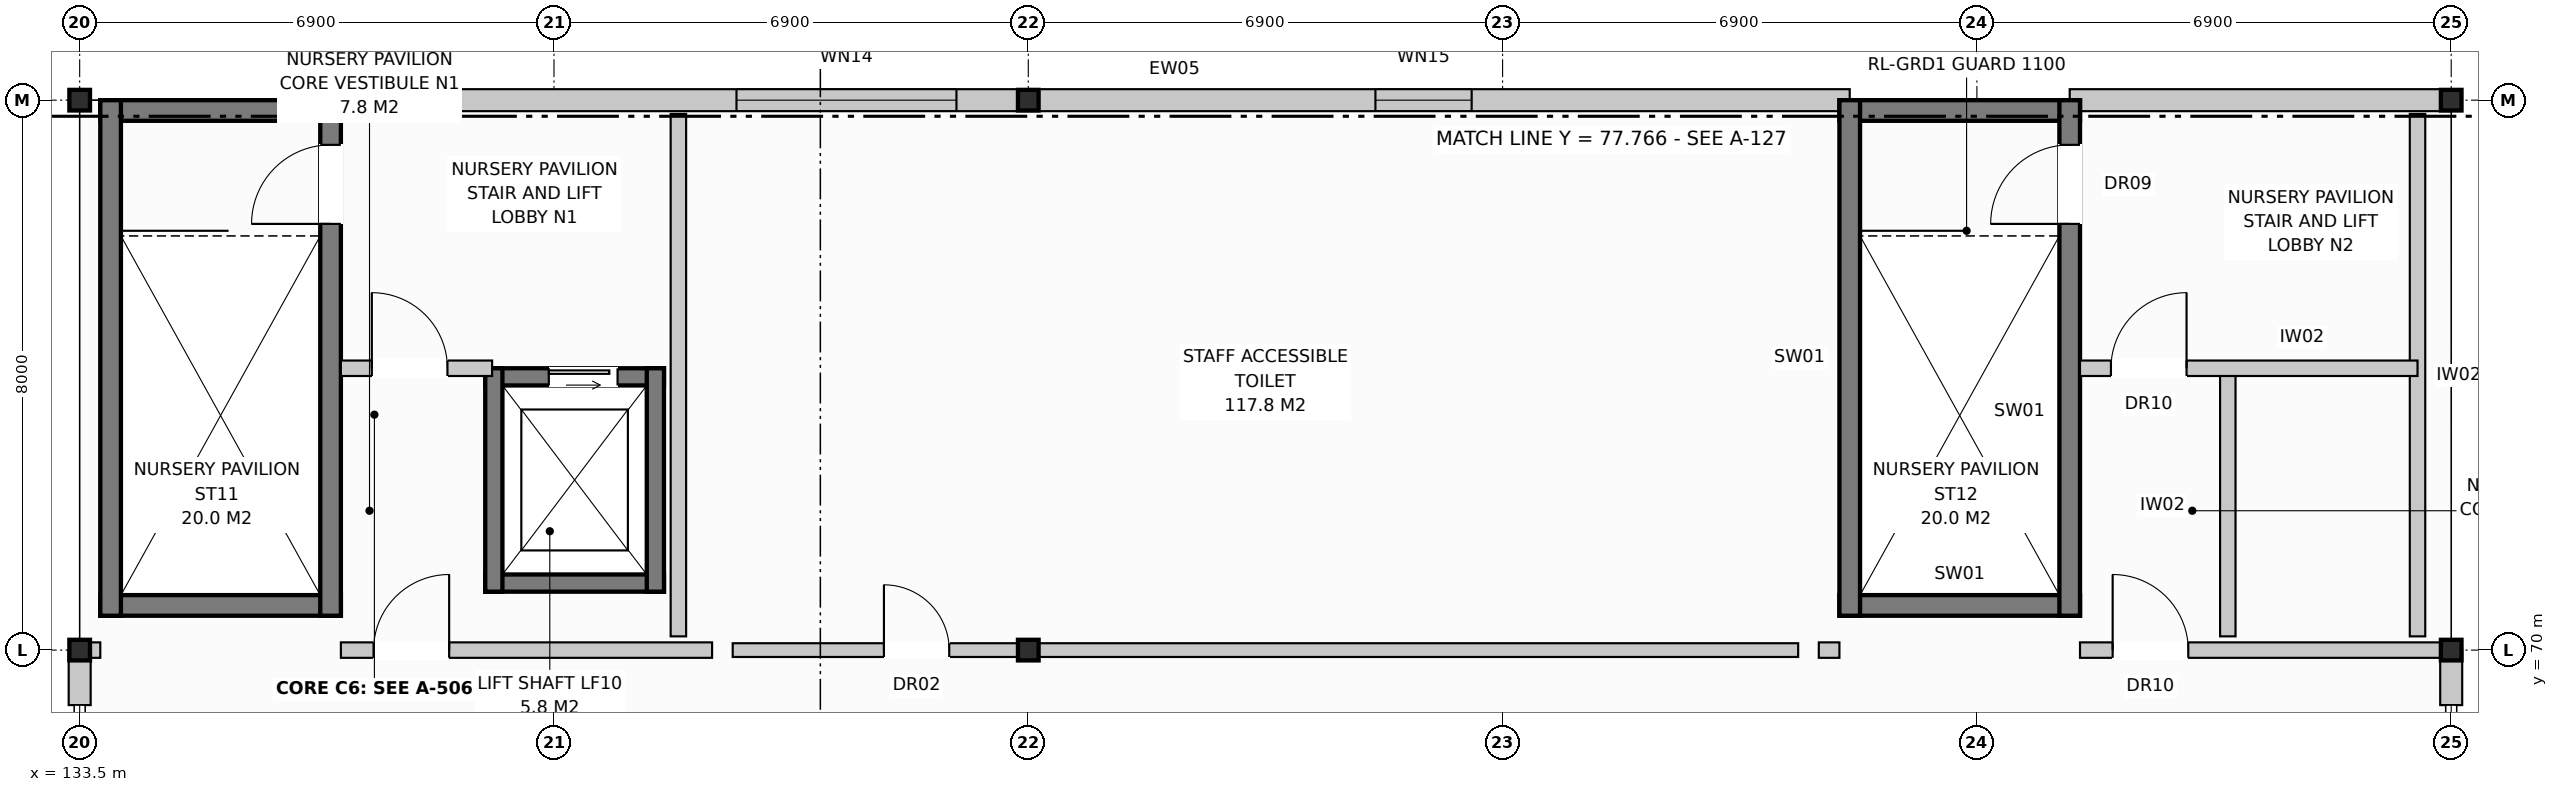
"""IFC4 building model, lengths in metres.
Left out: names, types, materials, properties, quantities, classifications, styles, units other than length and angle.
Written with IfcOpenShell. Run it as: python <this file> out.ifc"""

import sys

from ifc_helpers import new_model, si_unit, direction, frame, frame_2d, origin, origin_with_axes, origin_2d, place, context, subcontext, project, spatial, rectangle, i_section, extrude, element, fill, save


model = new_model("IFC4")
c1 = context("Model", 3, precision=1e-05, world=origin(), true_north=direction((0.0, 1.0)))
c2 = subcontext(c1, "Body", "Model", "MODEL_VIEW")
j1 = project(units=[si_unit("LENGTHUNIT", "METRE"), si_unit("PLANEANGLEUNIT", "RADIAN")], contexts=[c1])
p1 = place(None, origin())
s1 = spatial("IfcSite", under=j1, at=p1, CompositionType="ELEMENT")
p2 = place(p1, origin())
s2 = spatial("IfcBuilding", under=s1, at=p2, CompositionType="ELEMENT")
p3 = place(p2, frame((0.0, 0.0, 4.4)))
s3 = spatial("IfcBuildingStorey", under=s2, at=p3, CompositionType="ELEMENT", Elevation=4.4)
for number, where, z_axis, x_axis in (
    (1, (133.5, 70.0, 0.0), (0.0, 0.0, 1.0), (1.0, 0.0, 0.0)),
    (2, (133.5, 78.0, 0.0), (0.0, 0.0, 1.0), (1.0, 0.0, 0.0)),
    (3, (147.3, 70.0, 0.0), (0.0, 0.0, 1.0), (1.0, 0.0, 0.0)),
    (4, (147.3, 78.0, 0.0), (0.0, 0.0, 1.0), (1.0, 0.0, 0.0)),
    (5, (168.0, 70.0, 0.0), (0.0, 0.0, 1.0), (1.0, 0.0, 0.0)),
    (6, (168.0, 78.0, 0.0), (0.0, 0.0, 1.0), (1.0, 0.0, 0.0)),
):
    element("IfcColumn", number, at=place(p3, frame(where, z_axis=z_axis, x_axis=x_axis)), inside=s3, PredefinedType="COLUMN", context=c2, shape_type="SweptSolid", body=[
        extrude(i_section(OverallWidth=0.3, OverallDepth=0.3, WebThickness=0.011, FlangeThickness=0.019, at=origin_2d()), origin(), (0.0, 0.0, 1.0), 3.6),
    ])
p4 = place(p3, frame((133.5, 69.2, 0.0), z_axis=(0.0, 0.0, 1.0), x_axis=(0.0, 1.0, 0.0)))
e7 = element("IfcWall", 7, at=p4, inside=s3, PredefinedType="STANDARD", context=c2, shape_type="SweptSolid", body=[
    extrude(rectangle(XDim=0.8, YDim=0.32, at=frame_2d((0.4, 0.0))), origin(), (0.0, 0.0, 1.0), 2.87),
])
p5 = place(p3, frame((168.0, 69.2, 0.0), z_axis=(0.0, 0.0, 1.0), x_axis=(0.0, 1.0, 0.0)))
e8 = element("IfcWall", 8, at=p5, inside=s3, PredefinedType="STANDARD", context=c2, shape_type="SweptSolid", body=[
    extrude(rectangle(XDim=0.8, YDim=0.32, at=frame_2d((0.4, 0.0))), origin(), (0.0, 0.0, 1.0), 3.37),
])
p6 = place(p3, frame((137.05, 78.0, 0.0), z_axis=(0.0, 0.0, 1.0), x_axis=(1.0, 0.0, 0.0)))
e9 = element("IfcWall", 9, at=p6, inside=s3, PredefinedType="STANDARD", context=c2, shape_type="SweptSolid", body=[
    extrude(rectangle(XDim=22.2, YDim=0.32, at=frame_2d((11.1, 0.0))), origin(), (0.0, 0.0, 1.0), 3.37),
])
p7 = place(p6, frame((6.005, 0.0, 0.95)))
e10 = element("IfcOpeningElement", 10, at=p7, cuts=e9, PredefinedType="OPENING", context=c2, shape_type="SweptSolid", body=[
    extrude(rectangle(XDim=3.2, YDim=2.2, at=frame_2d((1.6, 1.1))), frame((0.0, 0.172, 0.0), z_axis=(0.0, -1.0, 0.0), x_axis=(1.0, 0.0, 0.0)), (0.0, 0.0, 1.0), 0.344),
])
p8 = place(p6, frame((15.3, 0.0, 1.05)))
e11 = element("IfcOpeningElement", 11, at=p8, cuts=e9, PredefinedType="OPENING", context=c2, shape_type="SweptSolid", body=[
    extrude(rectangle(XDim=1.4, YDim=1.25, at=frame_2d((0.7, 0.625))), frame((0.0, 0.172, 0.0), z_axis=(0.0, -1.0, 0.0), x_axis=(1.0, 0.0, 0.0)), (0.0, 0.0, 1.0), 0.344),
])
p9 = place(p3, frame((162.45, 78.0, 0.0), z_axis=(0.0, 0.0, 1.0), x_axis=(1.0, 0.0, 0.0)))
e12 = element("IfcWall", 12, at=p9, inside=s3, PredefinedType="STANDARD", context=c2, shape_type="SweptSolid", body=[
    extrude(rectangle(XDim=5.55, YDim=0.32, at=frame_2d((2.775, 0.0))), origin(), (0.0, 0.0, 1.0), 3.37),
])
for number, where, z_axis, x_axis in (
    (13, (133.8, 77.85, 0.0), (0.0, 0.0, 1.0), (1.0, 0.0, 0.0)),
    (14, (133.8, 70.65, 0.0), (0.0, 0.0, 1.0), (1.0, 0.0, 0.0)),
):
    element("IfcWall", number, at=place(p3, frame(where, z_axis=z_axis, x_axis=x_axis)), inside=s3, PredefinedType="SHEAR", context=c2, shape_type="SweptSolid", body=[
        extrude(rectangle(XDim=3.5, YDim=0.3, at=frame_2d((1.75, 0.0))), origin(), (0.0, 0.0, 1.0), 3.33),
    ])
p10 = place(p3, frame((133.95, 70.5, 0.0), z_axis=(0.0, 0.0, 1.0), x_axis=(0.0, 1.0, 0.0)))
e15 = element("IfcWall", 15, at=p10, inside=s3, PredefinedType="SHEAR", context=c2, shape_type="SweptSolid", body=[
    extrude(rectangle(XDim=7.5, YDim=0.3, at=frame_2d((3.75, 0.0))), origin(), (0.0, 0.0, 1.0), 3.33),
])
p11 = place(p3, frame((137.15, 70.5, 0.0), z_axis=(0.0, 0.0, 1.0), x_axis=(0.0, 1.0, 0.0)))
e16 = element("IfcWall", 16, at=p11, inside=s3, PredefinedType="SHEAR", context=c2, shape_type="SweptSolid", body=[
    extrude(rectangle(XDim=7.5, YDim=0.3, at=frame_2d((3.75, 0.0))), origin(), (0.0, 0.0, 1.0), 3.33),
])
p12 = place(p11, frame((5.7, 0.0, 0.0)))
e17 = element("IfcOpeningElement", 17, at=p12, cuts=e16, PredefinedType="OPENING", context=c2, shape_type="SweptSolid", body=[
    extrude(rectangle(XDim=1.15, YDim=2.15, at=frame_2d((0.575, 1.075))), frame((0.0, 0.162, 0.0), z_axis=(0.0, -1.0, 0.0), x_axis=(1.0, 0.0, 0.0)), (0.0, 0.0, 1.0), 0.324),
])
p13 = place(p3, frame((139.4, 73.975, 0.0), z_axis=(0.0, 0.0, 1.0), x_axis=(1.0, 0.0, 0.0)))
e18 = element("IfcWall", 18, at=p13, inside=s3, PredefinedType="SHEAR", context=c2, shape_type="SweptSolid", body=[
    extrude(rectangle(XDim=2.6, YDim=0.25, at=frame_2d((1.3, 0.0))), origin(), (0.0, 0.0, 1.0), 3.33),
])
p14 = place(p13, frame((0.925, 0.0, 0.0)))
e19 = element("IfcOpeningElement", 19, at=p14, cuts=e18, PredefinedType="OPENING", context=c2, shape_type="SweptSolid", body=[
    extrude(rectangle(XDim=1.0, YDim=2.1, at=frame_2d((0.5, 1.05))), frame((0.0, 0.137, 0.0), z_axis=(0.0, -1.0, 0.0), x_axis=(1.0, 0.0, 0.0)), (0.0, 0.0, 1.0), 0.274),
])
p15 = place(p3, frame((139.4, 70.975, 0.0), z_axis=(0.0, 0.0, 1.0), x_axis=(1.0, 0.0, 0.0)))
e20 = element("IfcWall", 20, at=p15, inside=s3, PredefinedType="SHEAR", context=c2, shape_type="SweptSolid", body=[
    extrude(rectangle(XDim=2.6, YDim=0.25, at=frame_2d((1.3, 0.0))), origin(), (0.0, 0.0, 1.0), 3.33),
])
for number, where, z_axis, x_axis in (
    (21, (139.525, 70.85, 0.0), (0.0, 0.0, 1.0), (0.0, 1.0, 0.0)),
    (22, (141.875, 70.85, 0.0), (0.0, 0.0, 1.0), (0.0, 1.0, 0.0)),
):
    element("IfcWall", number, at=place(p3, frame(where, z_axis=z_axis, x_axis=x_axis)), inside=s3, PredefinedType="SHEAR", context=c2, shape_type="SweptSolid", body=[
        extrude(rectangle(XDim=3.25, YDim=0.25, at=frame_2d((1.625, 0.0))), origin(), (0.0, 0.0, 1.0), 3.33),
    ])
p16 = place(p3, frame((142.21, 70.2, 0.0), z_axis=(0.0, 0.0, 1.0), x_axis=(0.0, 1.0, 0.0)))
e23 = element("IfcWall", 23, at=p16, inside=s3, PredefinedType="PARTITIONING", context=c2, shape_type="SweptSolid", body=[
    extrude(rectangle(XDim=7.6, YDim=0.225, at=frame_2d((3.8, 0.0))), origin(), (0.0, 0.0, 1.0), 3.33),
])
p17 = place(p3, frame((137.3, 74.1, 0.0), z_axis=(0.0, 0.0, 1.0), x_axis=(1.0, 0.0, 0.0)))
e24 = element("IfcWall", 24, at=p17, inside=s3, PredefinedType="PARTITIONING", context=c2, shape_type="SweptSolid", body=[
    extrude(rectangle(XDim=2.2, YDim=0.225, at=frame_2d((1.1, 0.0))), origin(), (0.0, 0.0, 1.0), 3.33),
])
p18 = place(p17, frame((0.45, 0.0, 0.0)))
e25 = element("IfcOpeningElement", 25, at=p18, cuts=e24, PredefinedType="OPENING", context=c2, shape_type="SweptSolid", body=[
    extrude(rectangle(XDim=1.1, YDim=2.15, at=frame_2d((0.55, 1.075))), frame((0.0, 0.125, 0.0), z_axis=(0.0, -1.0, 0.0), x_axis=(1.0, 0.0, 0.0)), (0.0, 0.0, 1.0), 0.249),
])
p19 = place(p3, frame((133.65, 70.0, 0.0), z_axis=(0.0, 0.0, 1.0), x_axis=(1.0, 0.0, 0.0)))
e26 = element("IfcWall", 26, at=p19, inside=s3, PredefinedType="PARTITIONING", context=c2, shape_type="SweptSolid", body=[
    extrude(rectangle(XDim=0.15, YDim=0.225, at=frame_2d((0.075, 0.0))), origin(), (0.0, 0.0, 1.0), 3.33),
])
p20 = place(p3, frame((137.3, 70.0, 0.0), z_axis=(0.0, 0.0, 1.0), x_axis=(1.0, 0.0, 0.0)))
e27 = element("IfcWall", 27, at=p20, inside=s3, PredefinedType="PARTITIONING", context=c2, shape_type="SweptSolid", body=[
    extrude(rectangle(XDim=5.4, YDim=0.225, at=frame_2d((2.7, 0.0))), origin(), (0.0, 0.0, 1.0), 2.79),
])
p21 = place(p20, frame((0.475, 0.0, 0.0)))
e28 = element("IfcOpeningElement", 28, at=p21, cuts=e27, PredefinedType="OPENING", context=c2, shape_type="SweptSolid", body=[
    extrude(rectangle(XDim=1.1, YDim=2.15, at=frame_2d((0.55, 1.075))), frame((0.0, 0.125, 0.0), z_axis=(0.0, -1.0, 0.0), x_axis=(1.0, 0.0, 0.0)), (0.0, 0.0, 1.0), 0.249),
])
for number, where, z_axis, x_axis in (
    (29, (159.1, 77.85, 0.0), (0.0, 0.0, 1.0), (1.0, 0.0, 0.0)),
    (30, (159.1, 70.65, 0.0), (0.0, 0.0, 1.0), (1.0, 0.0, 0.0)),
):
    element("IfcWall", number, at=place(p3, frame(where, z_axis=z_axis, x_axis=x_axis)), inside=s3, PredefinedType="SHEAR", context=c2, shape_type="SweptSolid", body=[
        extrude(rectangle(XDim=3.5, YDim=0.3, at=frame_2d((1.75, 0.0))), origin(), (0.0, 0.0, 1.0), 3.33),
    ])
p22 = place(p3, frame((159.25, 70.5, 0.0), z_axis=(0.0, 0.0, 1.0), x_axis=(0.0, 1.0, 0.0)))
e31 = element("IfcWall", 31, at=p22, inside=s3, PredefinedType="SHEAR", context=c2, shape_type="SweptSolid", body=[
    extrude(rectangle(XDim=7.5, YDim=0.3, at=frame_2d((3.75, 0.0))), origin(), (0.0, 0.0, 1.0), 3.33),
])
p23 = place(p3, frame((162.45, 70.5, 0.0), z_axis=(0.0, 0.0, 1.0), x_axis=(0.0, 1.0, 0.0)))
e32 = element("IfcWall", 32, at=p23, inside=s3, PredefinedType="SHEAR", context=c2, shape_type="SweptSolid", body=[
    extrude(rectangle(XDim=7.5, YDim=0.3, at=frame_2d((3.75, 0.0))), origin(), (0.0, 0.0, 1.0), 3.33),
])
p24 = place(p23, frame((5.7, 0.0, 0.0)))
e33 = element("IfcOpeningElement", 33, at=p24, cuts=e32, PredefinedType="OPENING", context=c2, shape_type="SweptSolid", body=[
    extrude(rectangle(XDim=1.15, YDim=2.15, at=frame_2d((0.575, 1.075))), frame((0.0, 0.162, 0.0), z_axis=(0.0, -1.0, 0.0), x_axis=(1.0, 0.0, 0.0)), (0.0, 0.0, 1.0), 0.324),
])
p25 = place(p3, frame((167.51, 70.2, 0.0), z_axis=(0.0, 0.0, 1.0), x_axis=(0.0, 1.0, 0.0)))
e34 = element("IfcWall", 34, at=p25, inside=s3, PredefinedType="PARTITIONING", context=c2, shape_type="SweptSolid", body=[
    extrude(rectangle(XDim=7.6, YDim=0.225, at=frame_2d((3.8, 0.0))), origin(), (0.0, 0.0, 1.0), 3.33),
])
p26 = place(p3, frame((164.75, 70.2, 0.0), z_axis=(0.0, 0.0, 1.0), x_axis=(0.0, 1.0, 0.0)))
e35 = element("IfcWall", 35, at=p26, inside=s3, PredefinedType="PARTITIONING", context=c2, shape_type="SweptSolid", body=[
    extrude(rectangle(XDim=3.8, YDim=0.225, at=frame_2d((1.9, 0.0))), origin(), (0.0, 0.0, 1.0), 3.33),
])
p27 = place(p3, frame((162.6, 74.1, 0.0), z_axis=(0.0, 0.0, 1.0), x_axis=(1.0, 0.0, 0.0)))
e36 = element("IfcWall", 36, at=p27, inside=s3, PredefinedType="PARTITIONING", context=c2, shape_type="SweptSolid", body=[
    extrude(rectangle(XDim=4.91, YDim=0.225, at=frame_2d((2.455, 0.0))), origin(), (0.0, 0.0, 1.0), 3.33),
])
p28 = place(p27, frame((0.45, 0.0, 0.0)))
e37 = element("IfcOpeningElement", 37, at=p28, cuts=e36, PredefinedType="OPENING", context=c2, shape_type="SweptSolid", body=[
    extrude(rectangle(XDim=1.1, YDim=2.15, at=frame_2d((0.55, 1.075))), frame((0.0, 0.125, 0.0), z_axis=(0.0, -1.0, 0.0), x_axis=(1.0, 0.0, 0.0)), (0.0, 0.0, 1.0), 0.249),
])
p29 = place(p3, frame((158.8, 70.0, 0.0), z_axis=(0.0, 0.0, 1.0), x_axis=(1.0, 0.0, 0.0)))
e38 = element("IfcWall", 38, at=p29, inside=s3, PredefinedType="PARTITIONING", context=c2, shape_type="SweptSolid", body=[
    extrude(rectangle(XDim=0.3, YDim=0.225, at=frame_2d((0.15, 0.0))), origin(), (0.0, 0.0, 1.0), 3.33),
])
p30 = place(p3, frame((162.6, 70.0, 0.0), z_axis=(0.0, 0.0, 1.0), x_axis=(1.0, 0.0, 0.0)))
e39 = element("IfcWall", 39, at=p30, inside=s3, PredefinedType="PARTITIONING", context=c2, shape_type="SweptSolid", body=[
    extrude(rectangle(XDim=5.25, YDim=0.225, at=frame_2d((2.625, 0.0))), origin(), (0.0, 0.0, 1.0), 2.69),
])
p31 = place(p30, frame((0.475, 0.0, 0.0)))
e40 = element("IfcOpeningElement", 40, at=p31, cuts=e39, PredefinedType="OPENING", context=c2, shape_type="SweptSolid", body=[
    extrude(rectangle(XDim=1.1, YDim=2.15, at=frame_2d((0.55, 1.075))), frame((0.0, 0.125, 0.0), z_axis=(0.0, -1.0, 0.0), x_axis=(1.0, 0.0, 0.0)), (0.0, 0.0, 1.0), 0.249),
])
p32 = place(p3, frame((143.0, 70.0, 0.0), z_axis=(0.0, 0.0, 1.0), x_axis=(1.0, 0.0, 0.0)))
e41 = element("IfcWall", 41, at=p32, inside=s3, PredefinedType="PARTITIONING", context=c2, shape_type="SweptSolid", body=[
    extrude(rectangle(XDim=15.5, YDim=0.2, at=frame_2d((7.75, 0.0))), origin(), (0.0, 0.0, 1.0), 2.69),
])
p33 = place(p32, frame((2.2, 0.0, 0.0)))
e42 = element("IfcOpeningElement", 42, at=p33, cuts=e41, PredefinedType="OPENING", context=c2, shape_type="SweptSolid", body=[
    extrude(rectangle(XDim=0.95, YDim=2.15, at=frame_2d((0.475, 1.075))), frame((0.0, 0.112, 0.0), z_axis=(0.0, -1.0, 0.0), x_axis=(1.0, 0.0, 0.0)), (0.0, 0.0, 1.0), 0.224),
])
p34 = place(p7, origin_with_axes())
e43 = element("IfcWindow", 43, at=p34, inside=s3, PartitioningType="SINGLE_PANEL", PredefinedType="WINDOW", context=c2, shape_type="SweptSolid", body=[
    extrude(rectangle(XDim=3.2, YDim=2.2, at=frame_2d((1.6, 1.1))), frame((0.0, 0.03, 0.0), z_axis=(0.0, -1.0, 0.0), x_axis=(1.0, 0.0, 0.0)), (0.0, 0.0, 1.0), 0.06),
])
fill(e10, e43)
p35 = place(p8, origin_with_axes())
e44 = element("IfcWindow", 44, at=p35, inside=s3, PartitioningType="SINGLE_PANEL", PredefinedType="WINDOW", context=c2, shape_type="SweptSolid", body=[
    extrude(rectangle(XDim=1.4, YDim=1.25, at=frame_2d((0.7, 0.625))), frame((0.0, 0.03, 0.0), z_axis=(0.0, -1.0, 0.0), x_axis=(1.0, 0.0, 0.0)), (0.0, 0.0, 1.0), 0.06),
])
fill(e11, e44)
p36 = place(p12, origin_with_axes())
e45 = element("IfcDoor", 45, at=p36, inside=s3, OperationType="SINGLE_SWING_LEFT", PredefinedType="DOOR", context=c2, shape_type="SweptSolid", body=[
    extrude(rectangle(XDim=1.15, YDim=2.15, at=frame_2d((0.575, 1.075))), frame((0.0, 0.025, 0.0), z_axis=(0.0, -1.0, 0.0), x_axis=(1.0, 0.0, 0.0)), (0.0, 0.0, 1.0), 0.05),
])
fill(e17, e45)
p37 = place(p14, origin_with_axes())
e46 = element("IfcDoor", 46, at=p37, inside=s3, OperationType="SLIDING_TO_LEFT", PredefinedType="DOOR", context=c2, shape_type="SweptSolid", body=[
    extrude(rectangle(XDim=1.0, YDim=2.1, at=frame_2d((0.5, 1.05))), frame((0.0, 0.025, 0.0), z_axis=(0.0, -1.0, 0.0), x_axis=(1.0, 0.0, 0.0)), (0.0, 0.0, 1.0), 0.05),
])
fill(e19, e46)
p38 = place(p18, origin_with_axes())
e47 = element("IfcDoor", 47, at=p38, inside=s3, OperationType="SINGLE_SWING_LEFT", PredefinedType="DOOR", context=c2, shape_type="SweptSolid", body=[
    extrude(rectangle(XDim=1.1, YDim=2.15, at=frame_2d((0.55, 1.075))), frame((0.0, 0.025, 0.0), z_axis=(0.0, -1.0, 0.0), x_axis=(1.0, 0.0, 0.0)), (0.0, 0.0, 1.0), 0.05),
])
fill(e25, e47)
p39 = place(p21, origin_with_axes())
e48 = element("IfcDoor", 48, at=p39, inside=s3, OperationType="SINGLE_SWING_RIGHT", PredefinedType="DOOR", context=c2, shape_type="SweptSolid", body=[
    extrude(rectangle(XDim=1.1, YDim=2.15, at=frame_2d((0.55, 1.075))), frame((0.0, 0.025, 0.0), z_axis=(0.0, -1.0, 0.0), x_axis=(1.0, 0.0, 0.0)), (0.0, 0.0, 1.0), 0.05),
])
fill(e28, e48)
p40 = place(p24, origin_with_axes())
e49 = element("IfcDoor", 49, at=p40, inside=s3, OperationType="SINGLE_SWING_LEFT", PredefinedType="DOOR", context=c2, shape_type="SweptSolid", body=[
    extrude(rectangle(XDim=1.15, YDim=2.15, at=frame_2d((0.575, 1.075))), frame((0.0, 0.025, 0.0), z_axis=(0.0, -1.0, 0.0), x_axis=(1.0, 0.0, 0.0)), (0.0, 0.0, 1.0), 0.05),
])
fill(e33, e49)
p41 = place(p28, origin_with_axes())
e50 = element("IfcDoor", 50, at=p41, inside=s3, OperationType="SINGLE_SWING_RIGHT", PredefinedType="DOOR", context=c2, shape_type="SweptSolid", body=[
    extrude(rectangle(XDim=1.1, YDim=2.15, at=frame_2d((0.55, 1.075))), frame((0.0, 0.025, 0.0), z_axis=(0.0, -1.0, 0.0), x_axis=(1.0, 0.0, 0.0)), (0.0, 0.0, 1.0), 0.05),
])
fill(e37, e50)
p42 = place(p31, origin_with_axes())
e51 = element("IfcDoor", 51, at=p42, inside=s3, OperationType="SINGLE_SWING_LEFT", PredefinedType="DOOR", context=c2, shape_type="SweptSolid", body=[
    extrude(rectangle(XDim=1.1, YDim=2.15, at=frame_2d((0.55, 1.075))), frame((0.0, 0.025, 0.0), z_axis=(0.0, -1.0, 0.0), x_axis=(1.0, 0.0, 0.0)), (0.0, 0.0, 1.0), 0.05),
])
fill(e40, e51)
p43 = place(p33, origin_with_axes())
e52 = element("IfcDoor", 52, at=p43, inside=s3, OperationType="SINGLE_SWING_LEFT", PredefinedType="DOOR", context=c2, shape_type="SweptSolid", body=[
    extrude(rectangle(XDim=0.95, YDim=2.15, at=frame_2d((0.475, 1.075))), frame((0.0, 0.025, 0.0), z_axis=(0.0, -1.0, 0.0), x_axis=(1.0, 0.0, 0.0)), (0.0, 0.0, 1.0), 0.05),
])
fill(e42, e52)
save(model, sys.argv[1])
